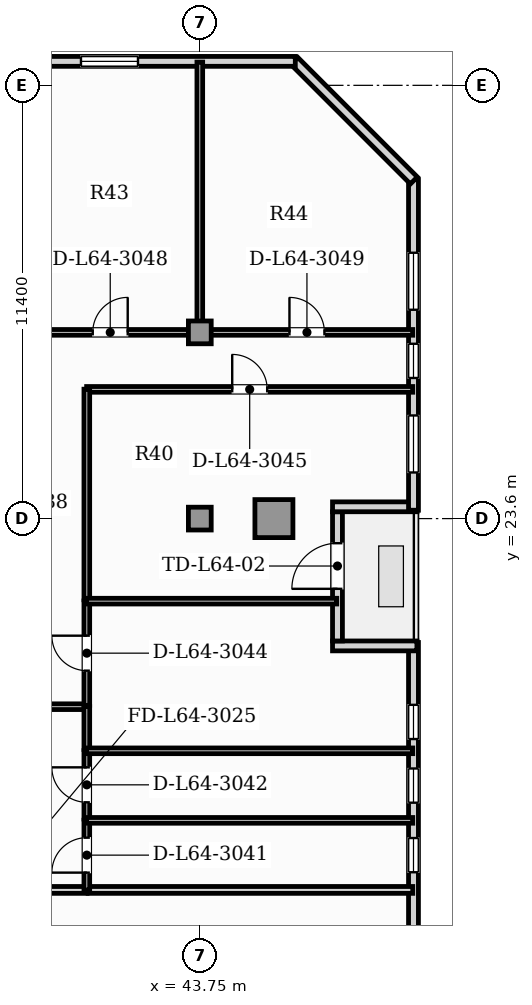
"""IFC4 building model, lengths in metres.
Left out: names, types, materials, properties, quantities, classifications, styles, units other than length and angle.
Written with IfcOpenShell. Run it as: python <this file> out.ifc"""

import sys

from ifc_helpers import new_model, si_unit, direction, frame, frame_2d, origin, origin_2d, place, context, subcontext, project, spatial, rectangle, hollow_rectangle, extrude, element, fill, save


model = new_model("IFC4")
c1 = context("Model", 3, precision=1e-05, world=origin(), true_north=direction((0.0, 1.0)))
c2 = subcontext(c1, "Body", "Model", "MODEL_VIEW")
j1 = project(units=[si_unit("LENGTHUNIT", "METRE"), si_unit("PLANEANGLEUNIT", "RADIAN")], contexts=[c1])
p1 = place(None, origin())
s1 = spatial("IfcSite", under=j1, at=p1, CompositionType="ELEMENT")
p2 = place(p1, origin())
s2 = spatial("IfcBuilding", under=s1, at=p2, CompositionType="ELEMENT")
p3 = place(p2, frame((0.0, 0.0, 260.6)))
s3 = spatial("IfcBuildingStorey", under=s2, at=p3, CompositionType="ELEMENT", Elevation=260.6)
p4 = place(p3, frame((45.7, 23.6, 0.0), z_axis=(0.0, 0.0, 1.0), x_axis=(1.0, 0.0, 0.0)))
e1 = element("IfcColumn", 1, at=p4, inside=s3, PredefinedType="USERDEFINED", context=c2, shape_type="SweptSolid", body=[
    extrude(hollow_rectangle(XDim=1.0, YDim=1.0, WallThickness=0.06, at=origin_2d()), origin(), (0.0, 0.0, 1.0), 3.85),
])
for number, where, z_axis, x_axis in (
    (2, (43.75, 23.6, 0.0), (0.0, 0.0, 1.0), (1.0, 0.0, 0.0)),
    (3, (43.75, 28.5, 0.0), (0.0, 0.0, 1.0), (1.0, 0.0, 0.0)),
):
    element("IfcColumn", number, at=place(p3, frame(where, z_axis=z_axis, x_axis=x_axis)), inside=s3, PredefinedType="COLUMN", context=c2, shape_type="SweptSolid", body=[
        extrude(rectangle(XDim=0.6, YDim=0.6, at=origin_2d()), origin(), (0.0, 0.0, 1.0), 3.85),
    ])
p5 = place(p3, frame((49.372, 3.24, 0.0), z_axis=(0.0, 0.0, 1.0), x_axis=(0.0, 1.0, 0.0)))
e4 = element("IfcWall", 4, at=p5, inside=s3, PredefinedType="SOLIDWALL", context=c2, shape_type="SweptSolid", body=[
    extrude(rectangle(XDim=17.1, YDim=0.26, at=frame_2d((8.55, 0.0))), origin(), (0.0, 0.0, 1.0), 3.65),
])
p6 = place(p5, frame((11.055, 0.0, 0.95)))
e5 = element("IfcOpeningElement", 5, at=p6, cuts=e4, PredefinedType="OPENING", context=c2, shape_type="SweptSolid", body=[
    extrude(rectangle(XDim=0.9, YDim=1.5, at=frame_2d((0.45, 0.75))), frame((0.0, 0.14, 0.0), z_axis=(0.0, -1.0, 0.0), x_axis=(1.0, 0.0, 0.0)), (0.0, 0.0, 1.0), 0.28),
])
p7 = place(p5, frame((12.885, 0.0, 0.95)))
e6 = element("IfcOpeningElement", 6, at=p7, cuts=e4, PredefinedType="OPENING", context=c2, shape_type="SweptSolid", body=[
    extrude(rectangle(XDim=0.9, YDim=1.5, at=frame_2d((0.45, 0.75))), frame((0.0, 0.14, 0.0), z_axis=(0.0, -1.0, 0.0), x_axis=(1.0, 0.0, 0.0)), (0.0, 0.0, 1.0), 0.28),
])
p8 = place(p5, frame((14.56, 0.0, 0.95)))
e7 = element("IfcOpeningElement", 7, at=p8, cuts=e4, PredefinedType="OPENING", context=c2, shape_type="SweptSolid", body=[
    extrude(rectangle(XDim=0.9, YDim=1.5, at=frame_2d((0.45, 0.75))), frame((0.0, 0.14, 0.0), z_axis=(0.0, -1.0, 0.0), x_axis=(1.0, 0.0, 0.0)), (0.0, 0.0, 1.0), 0.28),
])
p9 = place(p3, frame((49.462, 20.25, 0.0), z_axis=(0.0, 0.0, 1.0), x_axis=(-1.0, 0.0, 0.0)))
e8 = element("IfcWall", 8, at=p9, inside=s3, PredefinedType="SOLIDWALL", context=c2, shape_type="SweptSolid", body=[
    extrude(rectangle(XDim=2.22, YDim=0.26, at=frame_2d((1.11, 0.0))), origin(), (0.0, 0.0, 1.0), 3.65),
])
p10 = place(p3, frame((47.372, 20.38, 0.0), z_axis=(0.0, 0.0, 1.0), x_axis=(0.0, 1.0, 0.0)))
e9 = element("IfcWall", 9, at=p10, inside=s3, PredefinedType="SOLIDWALL", context=c2, shape_type="SweptSolid", body=[
    extrude(rectangle(XDim=3.4, YDim=0.26, at=frame_2d((1.7, 0.0))), origin(), (0.0, 0.0, 1.0), 3.19),
])
p11 = place(p10, frame((1.372, 0.0, 0.0)))
e10 = element("IfcOpeningElement", 10, at=p11, cuts=e9, PredefinedType="OPENING", context=c2, shape_type="SweptSolid", body=[
    extrude(rectangle(XDim=1.2, YDim=2.2, at=frame_2d((0.6, 1.1))), frame((0.0, 0.14, 0.0), z_axis=(0.0, -1.0, 0.0), x_axis=(1.0, 0.0, 0.0)), (0.0, 0.0, 1.0), 0.28),
])
p12 = place(p3, frame((47.242, 23.91, 0.0), z_axis=(0.0, 0.0, 1.0), x_axis=(1.0, 0.0, 0.0)))
e11 = element("IfcWall", 11, at=p12, inside=s3, PredefinedType="SOLIDWALL", context=c2, shape_type="SweptSolid", body=[
    extrude(rectangle(XDim=2.22, YDim=0.26, at=frame_2d((1.11, 0.0))), origin(), (0.0, 0.0, 1.0), 3.65),
])
p13 = place(p3, frame((49.372, 23.82, 0.0), z_axis=(0.0, 0.0, 1.0), x_axis=(0.0, 1.0, 0.0)))
e12 = element("IfcWall", 12, at=p13, inside=s3, PredefinedType="SOLIDWALL", context=c2, shape_type="SweptSolid", body=[
    extrude(rectangle(XDim=8.7, YDim=0.26, at=frame_2d((4.35, 0.0))), origin(), (0.0, 0.0, 1.0), 3.65),
])
p14 = place(p13, frame((3.48, 0.0, 0.95)))
e13 = element("IfcOpeningElement", 13, at=p14, cuts=e12, PredefinedType="OPENING", context=c2, shape_type="SweptSolid", body=[
    extrude(rectangle(XDim=0.9, YDim=1.5, at=frame_2d((0.45, 0.75))), frame((0.0, 0.14, 0.0), z_axis=(0.0, -1.0, 0.0), x_axis=(1.0, 0.0, 0.0)), (0.0, 0.0, 1.0), 0.28),
])
p15 = place(p13, frame((0.993, 0.0, 0.9)))
e14 = element("IfcOpeningElement", 14, at=p15, cuts=e12, PredefinedType="OPENING", context=c2, shape_type="SweptSolid", body=[
    extrude(rectangle(XDim=1.5, YDim=1.95, at=frame_2d((0.75, 0.975))), frame((0.0, 0.14, 0.0), z_axis=(0.0, -1.0, 0.0), x_axis=(1.0, 0.0, 0.0)), (0.0, 0.0, 1.0), 0.28),
])
p16 = place(p13, frame((5.275, 0.0, 0.9)))
e15 = element("IfcOpeningElement", 15, at=p16, cuts=e12, PredefinedType="OPENING", context=c2, shape_type="SweptSolid", body=[
    extrude(rectangle(XDim=1.5, YDim=1.95, at=frame_2d((0.75, 0.975))), frame((0.0, 0.14, 0.0), z_axis=(0.0, -1.0, 0.0), x_axis=(1.0, 0.0, 0.0)), (0.0, 0.0, 1.0), 0.28),
])
p17 = place(p3, frame((49.382, 32.497, 0.0), z_axis=(0.0, 0.0, 1.0), x_axis=(-0.707106781187, 0.707106781187, 0.0)))
e16 = element("IfcWall", 16, at=p17, inside=s3, PredefinedType="SOLIDWALL", context=c2, shape_type="SweptSolid", body=[
    extrude(rectangle(XDim=4.445, YDim=0.26, at=frame_2d((2.223, 0.0))), origin(), (0.0, 0.0, 1.0), 3.65),
])
p18 = place(p3, frame((46.262, 35.631, 0.0), z_axis=(0.0, 0.0, 1.0), x_axis=(-1.0, 0.0, 0.0)))
e17 = element("IfcWall", 17, at=p18, inside=s3, PredefinedType="SOLIDWALL", context=c2, shape_type="SweptSolid", body=[
    extrude(rectangle(XDim=35.024, YDim=0.26, at=frame_2d((17.512, 0.0))), origin(), (0.0, 0.0, 1.0), 3.65),
])
p19 = place(p18, frame((32.755, 0.0, 0.9)))
e18 = element("IfcOpeningElement", 18, at=p19, cuts=e17, PredefinedType="OPENING", context=c2, shape_type="SweptSolid", body=[
    extrude(rectangle(XDim=1.5, YDim=1.95, at=frame_2d((0.75, 0.975))), frame((0.0, 0.14, 0.0), z_axis=(0.0, -1.0, 0.0), x_axis=(1.0, 0.0, 0.0)), (0.0, 0.0, 1.0), 0.28),
])
p20 = place(p18, frame((29.501, 0.0, 0.9)))
e19 = element("IfcOpeningElement", 19, at=p20, cuts=e17, PredefinedType="OPENING", context=c2, shape_type="SweptSolid", body=[
    extrude(rectangle(XDim=1.5, YDim=1.95, at=frame_2d((0.75, 0.975))), frame((0.0, 0.14, 0.0), z_axis=(0.0, -1.0, 0.0), x_axis=(1.0, 0.0, 0.0)), (0.0, 0.0, 1.0), 0.28),
])
p21 = place(p18, frame((24.255, 0.0, 0.9)))
e20 = element("IfcOpeningElement", 20, at=p21, cuts=e17, PredefinedType="OPENING", context=c2, shape_type="SweptSolid", body=[
    extrude(rectangle(XDim=1.5, YDim=1.95, at=frame_2d((0.75, 0.975))), frame((0.0, 0.14, 0.0), z_axis=(0.0, -1.0, 0.0), x_axis=(1.0, 0.0, 0.0)), (0.0, 0.0, 1.0), 0.28),
])
p22 = place(p18, frame((20.244, 0.0, 0.9)))
e21 = element("IfcOpeningElement", 21, at=p22, cuts=e17, PredefinedType="OPENING", context=c2, shape_type="SweptSolid", body=[
    extrude(rectangle(XDim=1.5, YDim=1.95, at=frame_2d((0.75, 0.975))), frame((0.0, 0.14, 0.0), z_axis=(0.0, -1.0, 0.0), x_axis=(1.0, 0.0, 0.0)), (0.0, 0.0, 1.0), 0.28),
])
p23 = place(p18, frame((14.427, 0.0, 0.9)))
e22 = element("IfcOpeningElement", 22, at=p23, cuts=e17, PredefinedType="OPENING", context=c2, shape_type="SweptSolid", body=[
    extrude(rectangle(XDim=1.5, YDim=1.95, at=frame_2d((0.75, 0.975))), frame((0.0, 0.14, 0.0), z_axis=(0.0, -1.0, 0.0), x_axis=(1.0, 0.0, 0.0)), (0.0, 0.0, 1.0), 0.28),
])
p24 = place(p18, frame((8.945, 0.0, 0.9)))
e23 = element("IfcOpeningElement", 23, at=p24, cuts=e17, PredefinedType="OPENING", context=c2, shape_type="SweptSolid", body=[
    extrude(rectangle(XDim=1.5, YDim=1.95, at=frame_2d((0.75, 0.975))), frame((0.0, 0.14, 0.0), z_axis=(0.0, -1.0, 0.0), x_axis=(1.0, 0.0, 0.0)), (0.0, 0.0, 1.0), 0.28),
])
p25 = place(p18, frame((4.139, 0.0, 0.9)))
e24 = element("IfcOpeningElement", 24, at=p25, cuts=e17, PredefinedType="OPENING", context=c2, shape_type="SweptSolid", body=[
    extrude(rectangle(XDim=1.5, YDim=1.95, at=frame_2d((0.75, 0.975))), frame((0.0, 0.14, 0.0), z_axis=(0.0, -1.0, 0.0), x_axis=(1.0, 0.0, 0.0)), (0.0, 0.0, 1.0), 0.28),
])
p26 = place(p3, frame((35.792, 13.83, 0.0), z_axis=(0.0, 0.0, 1.0), x_axis=(1.0, 0.0, 0.0)))
e25 = element("IfcWall", 25, at=p26, inside=s3, PredefinedType="PARTITIONING", context=c2, shape_type="SweptSolid", body=[
    extrude(rectangle(XDim=4.99, YDim=0.18, at=frame_2d((2.495, 0.0))), origin(), (0.0, 0.0, 1.0), 3.65),
])
p27 = place(p26, frame((1.995, 0.0, 0.0)))
e26 = element("IfcOpeningElement", 26, at=p27, cuts=e25, PredefinedType="OPENING", context=c2, shape_type="SweptSolid", body=[
    extrude(rectangle(XDim=1.0, YDim=2.15, at=frame_2d((0.5, 1.075))), frame((0.0, 0.1, 0.0), z_axis=(0.0, -1.0, 0.0), x_axis=(1.0, 0.0, 0.0)), (0.0, 0.0, 1.0), 0.2),
])
p28 = place(p3, frame((40.812, 13.83, 0.0), z_axis=(0.0, 0.0, 1.0), x_axis=(1.0, 0.0, 0.0)))
e27 = element("IfcWall", 27, at=p28, inside=s3, PredefinedType="PARTITIONING", context=c2, shape_type="SweptSolid", body=[
    extrude(rectangle(XDim=8.541, YDim=0.18, at=frame_2d((4.271, 0.0))), origin(), (0.0, 0.0, 1.0), 3.65),
])
p29 = place(p3, frame((35.792, 18.651, 0.0), z_axis=(0.0, 0.0, 1.0), x_axis=(1.0, 0.0, 0.0)))
e28 = element("IfcWall", 28, at=p29, inside=s3, PredefinedType="PARTITIONING", context=c2, shape_type="SweptSolid", body=[
    extrude(rectangle(XDim=4.99, YDim=0.15, at=frame_2d((2.495, 0.0))), origin(), (0.0, 0.0, 1.0), 3.65),
])
p30 = place(p29, frame((2.035, 0.0, 0.0)))
e29 = element("IfcOpeningElement", 29, at=p30, cuts=e28, PredefinedType="OPENING", context=c2, shape_type="SweptSolid", body=[
    extrude(rectangle(XDim=0.92, YDim=2.1, at=frame_2d((0.46, 1.05))), frame((0.0, 0.085, 0.0), z_axis=(0.0, -1.0, 0.0), x_axis=(1.0, 0.0, 0.0)), (0.0, 0.0, 1.0), 0.17),
])
p31 = place(p3, frame((40.777, 13.825, 0.0), z_axis=(0.0, 0.0, 1.0), x_axis=(0.0, 1.0, 0.0)))
e30 = element("IfcWall", 30, at=p31, inside=s3, PredefinedType="PARTITIONING", context=c2, shape_type="SweptSolid", body=[
    extrude(rectangle(XDim=1.84, YDim=0.15, at=frame_2d((0.92, 0.0))), origin(), (0.0, 0.0, 1.0), 3.65),
])
p32 = place(p31, frame((0.46, 0.0, 0.0)))
e31 = element("IfcOpeningElement", 31, at=p32, cuts=e30, PredefinedType="OPENING", context=c2, shape_type="SweptSolid", body=[
    extrude(rectangle(XDim=0.92, YDim=2.1, at=frame_2d((0.46, 1.05))), frame((0.0, 0.085, 0.0), z_axis=(0.0, -1.0, 0.0), x_axis=(1.0, 0.0, 0.0)), (0.0, 0.0, 1.0), 0.17),
])
p33 = place(p3, frame((40.777, 15.695, 0.0), z_axis=(0.0, 0.0, 1.0), x_axis=(0.0, 1.0, 0.0)))
e32 = element("IfcWall", 32, at=p33, inside=s3, PredefinedType="PARTITIONING", context=c2, shape_type="SweptSolid", body=[
    extrude(rectangle(XDim=1.8, YDim=0.15, at=frame_2d((0.9, 0.0))), origin(), (0.0, 0.0, 1.0), 3.65),
])
p34 = place(p33, frame((0.44, 0.0, 0.0)))
e33 = element("IfcOpeningElement", 33, at=p34, cuts=e32, PredefinedType="OPENING", context=c2, shape_type="SweptSolid", body=[
    extrude(rectangle(XDim=0.92, YDim=2.1, at=frame_2d((0.46, 1.05))), frame((0.0, 0.085, 0.0), z_axis=(0.0, -1.0, 0.0), x_axis=(1.0, 0.0, 0.0)), (0.0, 0.0, 1.0), 0.17),
])
p35 = place(p3, frame((40.777, 17.525, 0.0), z_axis=(0.0, 0.0, 1.0), x_axis=(0.0, 1.0, 0.0)))
e34 = element("IfcWall", 34, at=p35, inside=s3, PredefinedType="PARTITIONING", context=c2, shape_type="SweptSolid", body=[
    extrude(rectangle(XDim=1.131, YDim=0.15, at=frame_2d((0.565, 0.0))), origin(), (0.0, 0.0, 1.0), 3.65),
])
p36 = place(p3, frame((40.777, 18.686, 0.0), z_axis=(0.0, 0.0, 1.0), x_axis=(0.0, 1.0, 0.0)))
e35 = element("IfcWall", 35, at=p36, inside=s3, PredefinedType="PARTITIONING", context=c2, shape_type="SweptSolid", body=[
    extrude(rectangle(XDim=2.747, YDim=0.15, at=frame_2d((1.374, 0.0))), origin(), (0.0, 0.0, 1.0), 3.65),
])
p37 = place(p36, frame((0.914, 0.0, 0.0)))
e36 = element("IfcOpeningElement", 36, at=p37, cuts=e35, PredefinedType="OPENING", context=c2, shape_type="SweptSolid", body=[
    extrude(rectangle(XDim=0.92, YDim=2.1, at=frame_2d((0.46, 1.05))), frame((0.0, 0.085, 0.0), z_axis=(0.0, -1.0, 0.0), x_axis=(1.0, 0.0, 0.0)), (0.0, 0.0, 1.0), 0.17),
])
p38 = place(p3, frame((40.772, 27.0, 0.0), z_axis=(0.0, 0.0, 1.0), x_axis=(1.0, 0.0, 0.0)))
e37 = element("IfcWall", 37, at=p38, inside=s3, PredefinedType="PARTITIONING", context=c2, shape_type="SweptSolid", body=[
    extrude(rectangle(XDim=8.581, YDim=0.15, at=frame_2d((4.29, 0.0))), origin(), (0.0, 0.0, 1.0), 3.65),
])
p39 = place(p38, frame((3.83, 0.0, 0.0)))
e38 = element("IfcOpeningElement", 38, at=p39, cuts=e37, PredefinedType="OPENING", context=c2, shape_type="SweptSolid", body=[
    extrude(rectangle(XDim=0.92, YDim=2.1, at=frame_2d((0.46, 1.05))), frame((0.0, 0.085, 0.0), z_axis=(0.0, -1.0, 0.0), x_axis=(1.0, 0.0, 0.0)), (0.0, 0.0, 1.0), 0.17),
])
p40 = place(p3, frame((40.777, 21.463, 0.0), z_axis=(0.0, 0.0, 1.0), x_axis=(0.0, 1.0, 0.0)))
e39 = element("IfcWall", 39, at=p40, inside=s3, PredefinedType="PARTITIONING", context=c2, shape_type="SweptSolid", body=[
    extrude(rectangle(XDim=5.542, YDim=0.15, at=frame_2d((2.771, 0.0))), origin(), (0.0, 0.0, 1.0), 3.65),
])
p41 = place(p3, frame((39.031, 28.5, 0.0), z_axis=(0.0, 0.0, 1.0), x_axis=(1.0, 0.0, 0.0)))
e40 = element("IfcWall", 40, at=p41, inside=s3, PredefinedType="PARTITIONING", context=c2, shape_type="SweptSolid", body=[
    extrude(rectangle(XDim=4.724, YDim=0.15, at=frame_2d((2.362, 0.0))), origin(), (0.0, 0.0, 1.0), 3.105),
])
p42 = place(p41, frame((1.902, 0.0, 0.0)))
e41 = element("IfcOpeningElement", 41, at=p42, cuts=e40, PredefinedType="OPENING", context=c2, shape_type="SweptSolid", body=[
    extrude(rectangle(XDim=0.92, YDim=2.1, at=frame_2d((0.46, 1.05))), frame((0.0, 0.085, 0.0), z_axis=(0.0, -1.0, 0.0), x_axis=(1.0, 0.0, 0.0)), (0.0, 0.0, 1.0), 0.17),
])
p43 = place(p3, frame((43.785, 28.5, 0.0), z_axis=(0.0, 0.0, 1.0), x_axis=(1.0, 0.0, 0.0)))
e42 = element("IfcWall", 42, at=p43, inside=s3, PredefinedType="PARTITIONING", context=c2, shape_type="SweptSolid", body=[
    extrude(rectangle(XDim=5.568, YDim=0.15, at=frame_2d((2.784, 0.0))), origin(), (0.0, 0.0, 1.0), 3.65),
])
p44 = place(p43, frame((2.324, 0.0, 0.0)))
e43 = element("IfcOpeningElement", 43, at=p44, cuts=e42, PredefinedType="OPENING", context=c2, shape_type="SweptSolid", body=[
    extrude(rectangle(XDim=0.92, YDim=2.1, at=frame_2d((0.46, 1.05))), frame((0.0, 0.085, 0.0), z_axis=(0.0, -1.0, 0.0), x_axis=(1.0, 0.0, 0.0)), (0.0, 0.0, 1.0), 0.17),
])
for number, where, z_axis, x_axis in (
    (44, (40.772, 15.66, 0.0), (0.0, 0.0, 1.0), (1.0, 0.0, 0.0)),
    (45, (40.772, 17.49, 0.0), (0.0, 0.0, 1.0), (1.0, 0.0, 0.0)),
):
    element("IfcWall", number, at=place(p3, frame(where, z_axis=z_axis, x_axis=x_axis)), inside=s3, PredefinedType="PARTITIONING", context=c2, shape_type="SweptSolid", body=[
        extrude(rectangle(XDim=8.581, YDim=0.15, at=frame_2d((4.29, 0.0))), origin(), (0.0, 0.0, 1.0), 3.65),
    ])
p45 = place(p3, frame((40.772, 21.428, 0.0), z_axis=(0.0, 0.0, 1.0), x_axis=(1.0, 0.0, 0.0)))
e46 = element("IfcWall", 46, at=p45, inside=s3, PredefinedType="PARTITIONING", context=c2, shape_type="SweptSolid", body=[
    extrude(rectangle(XDim=6.581, YDim=0.15, at=frame_2d((3.29, 0.0))), origin(), (0.0, 0.0, 1.0), 3.65),
])
p46 = place(p3, frame((43.75, 28.495, 0.0), z_axis=(0.0, 0.0, 1.0), x_axis=(0.0, 1.0, 0.0)))
e47 = element("IfcWall", 47, at=p46, inside=s3, PredefinedType="PARTITIONING", context=c2, shape_type="SweptSolid", body=[
    extrude(rectangle(XDim=7.116, YDim=0.15, at=frame_2d((3.558, 0.0))), origin(), (0.0, 0.0, 1.0), 3.65),
])
p47 = place(p11, frame((1.2, 0.0, 0.0), z_axis=(0.0, 0.0, 1.0), x_axis=(-1.0, 0.0, 0.0)))
e48 = element("IfcDoor", 48, at=p47, inside=s3, OperationType="SINGLE_SWING_RIGHT", PredefinedType="DOOR", context=c2, shape_type="SweptSolid", body=[
    extrude(rectangle(XDim=1.2, YDim=2.2, at=frame_2d((0.6, 1.1))), frame((0.0, 0.025, 0.0), z_axis=(0.0, -1.0, 0.0), x_axis=(1.0, 0.0, 0.0)), (0.0, 0.0, 1.0), 0.05),
])
fill(e10, e48)
p48 = place(p14, origin())
e49 = element("IfcWindow", 49, at=p48, inside=s3, PartitioningType="SINGLE_PANEL", PredefinedType="WINDOW", context=c2, shape_type="SweptSolid", body=[
    extrude(rectangle(XDim=0.9, YDim=1.5, at=frame_2d((0.45, 0.75))), frame((0.0, 0.03, 0.0), z_axis=(0.0, -1.0, 0.0), x_axis=(1.0, 0.0, 0.0)), (0.0, 0.0, 1.0), 0.06),
])
fill(e13, e49)
p49 = place(p6, origin())
e50 = element("IfcWindow", 50, at=p49, inside=s3, PartitioningType="SINGLE_PANEL", PredefinedType="WINDOW", context=c2, shape_type="SweptSolid", body=[
    extrude(rectangle(XDim=0.9, YDim=1.5, at=frame_2d((0.45, 0.75))), frame((0.0, 0.03, 0.0), z_axis=(0.0, -1.0, 0.0), x_axis=(1.0, 0.0, 0.0)), (0.0, 0.0, 1.0), 0.06),
])
fill(e5, e50)
p50 = place(p7, origin())
e51 = element("IfcWindow", 51, at=p50, inside=s3, PartitioningType="SINGLE_PANEL", PredefinedType="WINDOW", context=c2, shape_type="SweptSolid", body=[
    extrude(rectangle(XDim=0.9, YDim=1.5, at=frame_2d((0.45, 0.75))), frame((0.0, 0.03, 0.0), z_axis=(0.0, -1.0, 0.0), x_axis=(1.0, 0.0, 0.0)), (0.0, 0.0, 1.0), 0.06),
])
fill(e6, e51)
p51 = place(p8, origin())
e52 = element("IfcWindow", 52, at=p51, inside=s3, PartitioningType="SINGLE_PANEL", PredefinedType="WINDOW", context=c2, shape_type="SweptSolid", body=[
    extrude(rectangle(XDim=0.9, YDim=1.5, at=frame_2d((0.45, 0.75))), frame((0.0, 0.03, 0.0), z_axis=(0.0, -1.0, 0.0), x_axis=(1.0, 0.0, 0.0)), (0.0, 0.0, 1.0), 0.06),
])
fill(e7, e52)
p52 = place(p15, origin())
e53 = element("IfcWindow", 53, at=p52, inside=s3, PartitioningType="SINGLE_PANEL", PredefinedType="WINDOW", context=c2, shape_type="SweptSolid", body=[
    extrude(rectangle(XDim=1.5, YDim=1.95, at=frame_2d((0.75, 0.975))), frame((0.0, 0.03, 0.0), z_axis=(0.0, -1.0, 0.0), x_axis=(1.0, 0.0, 0.0)), (0.0, 0.0, 1.0), 0.06),
])
fill(e14, e53)
p53 = place(p25, origin())
e54 = element("IfcWindow", 54, at=p53, inside=s3, PartitioningType="SINGLE_PANEL", PredefinedType="WINDOW", context=c2, shape_type="SweptSolid", body=[
    extrude(rectangle(XDim=1.5, YDim=1.95, at=frame_2d((0.75, 0.975))), frame((0.0, 0.03, 0.0), z_axis=(0.0, -1.0, 0.0), x_axis=(1.0, 0.0, 0.0)), (0.0, 0.0, 1.0), 0.06),
])
fill(e24, e54)
p54 = place(p16, origin())
e55 = element("IfcWindow", 55, at=p54, inside=s3, PartitioningType="SINGLE_PANEL", PredefinedType="WINDOW", context=c2, shape_type="SweptSolid", body=[
    extrude(rectangle(XDim=1.5, YDim=1.95, at=frame_2d((0.75, 0.975))), frame((0.0, 0.03, 0.0), z_axis=(0.0, -1.0, 0.0), x_axis=(1.0, 0.0, 0.0)), (0.0, 0.0, 1.0), 0.06),
])
fill(e15, e55)
p55 = place(p32, origin())
e56 = element("IfcDoor", 56, at=p55, inside=s3, OperationType="SINGLE_SWING_LEFT", PredefinedType="DOOR", context=c2, shape_type="SweptSolid", body=[
    extrude(rectangle(XDim=0.92, YDim=2.1, at=frame_2d((0.46, 1.05))), frame((0.0, 0.025, 0.0), z_axis=(0.0, -1.0, 0.0), x_axis=(1.0, 0.0, 0.0)), (0.0, 0.0, 1.0), 0.05),
])
fill(e31, e56)
p56 = place(p34, origin())
e57 = element("IfcDoor", 57, at=p56, inside=s3, OperationType="SINGLE_SWING_RIGHT", PredefinedType="DOOR", context=c2, shape_type="SweptSolid", body=[
    extrude(rectangle(XDim=0.92, YDim=2.1, at=frame_2d((0.46, 1.05))), frame((0.0, 0.025, 0.0), z_axis=(0.0, -1.0, 0.0), x_axis=(1.0, 0.0, 0.0)), (0.0, 0.0, 1.0), 0.05),
])
fill(e33, e57)
p57 = place(p37, origin())
e58 = element("IfcDoor", 58, at=p57, inside=s3, OperationType="SINGLE_SWING_RIGHT", PredefinedType="DOOR", context=c2, shape_type="SweptSolid", body=[
    extrude(rectangle(XDim=0.92, YDim=2.1, at=frame_2d((0.46, 1.05))), frame((0.0, 0.025, 0.0), z_axis=(0.0, -1.0, 0.0), x_axis=(1.0, 0.0, 0.0)), (0.0, 0.0, 1.0), 0.05),
])
fill(e36, e58)
p58 = place(p39, origin())
e59 = element("IfcDoor", 59, at=p58, inside=s3, OperationType="SINGLE_SWING_LEFT", PredefinedType="DOOR", context=c2, shape_type="SweptSolid", body=[
    extrude(rectangle(XDim=0.92, YDim=2.1, at=frame_2d((0.46, 1.05))), frame((0.0, 0.025, 0.0), z_axis=(0.0, -1.0, 0.0), x_axis=(1.0, 0.0, 0.0)), (0.0, 0.0, 1.0), 0.05),
])
fill(e38, e59)
p59 = place(p42, origin())
e60 = element("IfcDoor", 60, at=p59, inside=s3, OperationType="SINGLE_SWING_RIGHT", PredefinedType="DOOR", context=c2, shape_type="SweptSolid", body=[
    extrude(rectangle(XDim=0.92, YDim=2.1, at=frame_2d((0.46, 1.05))), frame((0.0, 0.025, 0.0), z_axis=(0.0, -1.0, 0.0), x_axis=(1.0, 0.0, 0.0)), (0.0, 0.0, 1.0), 0.05),
])
fill(e41, e60)
p60 = place(p44, origin())
e61 = element("IfcDoor", 61, at=p60, inside=s3, OperationType="SINGLE_SWING_LEFT", PredefinedType="DOOR", context=c2, shape_type="SweptSolid", body=[
    extrude(rectangle(XDim=0.92, YDim=2.1, at=frame_2d((0.46, 1.05))), frame((0.0, 0.025, 0.0), z_axis=(0.0, -1.0, 0.0), x_axis=(1.0, 0.0, 0.0)), (0.0, 0.0, 1.0), 0.05),
])
fill(e43, e61)
save(model, sys.argv[1])
